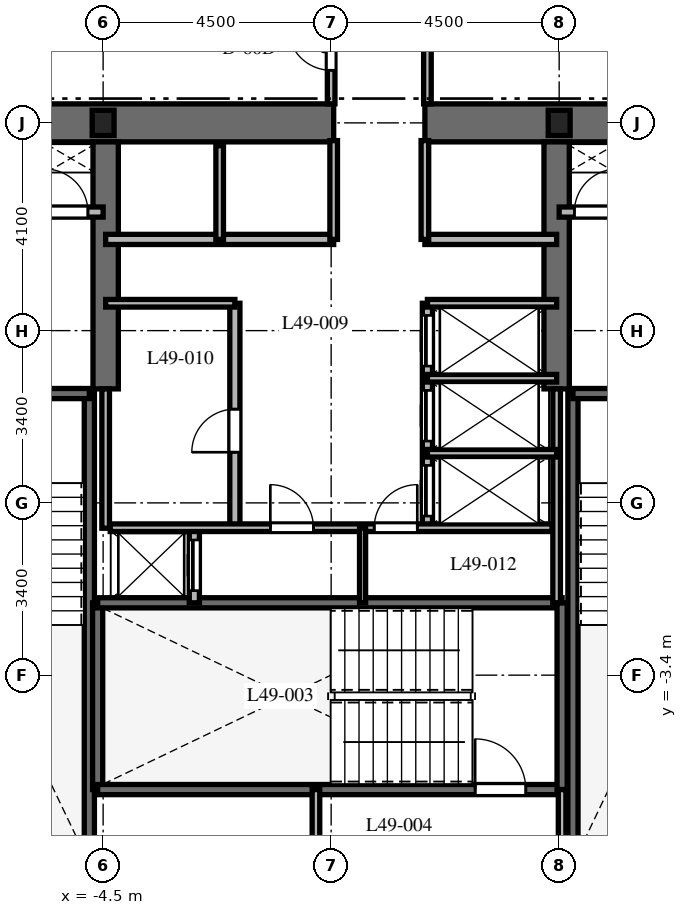
"""IFC4 building model, lengths in metres.
Left out: names, types, materials, properties, quantities, classifications, styles, units other than length and angle.
Written with IfcOpenShell. Run it as: python <this file> out.ifc"""

import sys

from ifc_helpers import new_model, si_unit, direction, frame, frame_2d, origin, origin_2d, place, context, subcontext, project, spatial, rectangle, i_section, extrude, element, fill, save


model = new_model("IFC4")
c1 = context("Model", 3, precision=1e-05, world=origin(), true_north=direction((0.0, 1.0)))
c2 = subcontext(c1, "Body", "Model", "MODEL_VIEW")
j1 = project(units=[si_unit("LENGTHUNIT", "METRE"), si_unit("PLANEANGLEUNIT", "RADIAN")], contexts=[c1])
p1 = place(None, origin())
s1 = spatial("IfcSite", under=j1, at=p1, CompositionType="ELEMENT")
p2 = place(p1, origin())
s2 = spatial("IfcBuilding", under=s1, at=p2, CompositionType="ELEMENT")
p3 = place(p2, frame((0.0, 0.0, 197.8)))
s3 = spatial("IfcBuildingStorey", under=s2, at=p3, CompositionType="ELEMENT", Elevation=197.8)
p4 = place(p3, frame((-9.375, 7.5, 0.0), z_axis=(0.0, 0.0, 1.0), x_axis=(1.0, 0.0, 0.0)))
e1 = element("IfcWall", 1, at=p4, inside=s3, PredefinedType="SHEAR", context=c2, shape_type="SweptSolid", body=[
    extrude(rectangle(XDim=9.425, YDim=0.75, at=frame_2d((4.712, 0.0))), origin(), (0.0, 0.0, 1.0), 3.7),
])
p5 = place(p3, frame((1.85, 7.5, 0.0), z_axis=(0.0, 0.0, 1.0), x_axis=(1.0, 0.0, 0.0)))
e2 = element("IfcWall", 2, at=p5, inside=s3, PredefinedType="SHEAR", context=c2, shape_type="SweptSolid", body=[
    extrude(rectangle(XDim=7.525, YDim=0.75, at=frame_2d((3.762, 0.0))), origin(), (0.0, 0.0, 1.0), 3.7),
])
for number, where, z_axis, x_axis in (
    (3, (-4.45, 2.25, 0.0), (0.0, 0.0, 1.0), (0.0, 1.0, 0.0)),
    (4, (4.45, 2.25, 0.0), (0.0, 0.0, 1.0), (0.0, 1.0, 0.0)),
):
    element("IfcWall", number, at=place(p3, frame(where, z_axis=z_axis, x_axis=x_axis)), inside=s3, PredefinedType="SHEAR", context=c2, shape_type="SweptSolid", body=[
        extrude(rectangle(XDim=4.875, YDim=0.5, at=frame_2d((2.438, 0.0))), origin(), (0.0, 0.0, 1.0), 3.7),
    ])
p6 = place(p3, frame((-4.772, -6.985, 0.0), z_axis=(0.0, 0.0, 1.0), x_axis=(0.0, 1.0, 0.0)))
e5 = element("IfcWall", 5, at=p6, inside=s3, PredefinedType="SHEAR", context=c2, shape_type="SweptSolid", body=[
    extrude(rectangle(XDim=9.143, YDim=0.2, at=frame_2d((4.572, 0.0))), origin(), (0.0, 0.0, 1.0), 3.7),
])
p7 = place(p3, frame((-8.458, 2.158, 0.0), z_axis=(0.0, 0.0, 1.0), x_axis=(1.0, 0.0, 0.0)))
e6 = element("IfcWall", 6, at=p7, inside=s3, PredefinedType="SHEAR", context=c2, shape_type="SweptSolid", body=[
    extrude(rectangle(XDim=3.686, YDim=0.2, at=frame_2d((1.843, 0.0))), origin(), (0.0, 0.0, 1.0), 3.7),
])
p8 = place(p7, frame((1.3, 0.0, 0.0)))
e7 = element("IfcOpeningElement", 7, at=p8, cuts=e6, PredefinedType="OPENING", context=c2, shape_type="SweptSolid", body=[
    extrude(rectangle(XDim=1.0, YDim=2.15, at=frame_2d((0.5, 1.075))), frame((0.0, 0.11, 0.0), z_axis=(0.0, -1.0, 0.0), x_axis=(1.0, 0.0, 0.0)), (0.0, 0.0, 1.0), 0.22),
])
p9 = place(p3, frame((4.772, -6.985, 0.0), z_axis=(0.0, 0.0, 1.0), x_axis=(0.0, 1.0, 0.0)))
e8 = element("IfcWall", 8, at=p9, inside=s3, PredefinedType="SHEAR", context=c2, shape_type="SweptSolid", body=[
    extrude(rectangle(XDim=9.143, YDim=0.2, at=frame_2d((4.572, 0.0))), origin(), (0.0, 0.0, 1.0), 3.7),
])
p10 = place(p3, frame((4.772, 2.158, 0.0), z_axis=(0.0, 0.0, 1.0), x_axis=(1.0, 0.0, 0.0)))
e9 = element("IfcWall", 9, at=p10, inside=s3, PredefinedType="SHEAR", context=c2, shape_type="SweptSolid", body=[
    extrude(rectangle(XDim=3.686, YDim=0.2, at=frame_2d((1.843, 0.0))), origin(), (0.0, 0.0, 1.0), 3.7),
])
p11 = place(p10, frame((1.35, 0.0, 0.0)))
e10 = element("IfcOpeningElement", 10, at=p11, cuts=e9, PredefinedType="OPENING", context=c2, shape_type="SweptSolid", body=[
    extrude(rectangle(XDim=1.0, YDim=2.15, at=frame_2d((0.5, 1.075))), frame((0.0, 0.11, 0.0), z_axis=(0.0, -1.0, 0.0), x_axis=(1.0, 0.0, 0.0)), (0.0, 0.0, 1.0), 0.22),
])
p12 = place(p3, frame((-4.608, -5.658, 0.0), z_axis=(0.0, 0.0, 1.0), x_axis=(0.0, 1.0, 0.0)))
e11 = element("IfcWall", 11, at=p12, inside=s3, PredefinedType="SHEAR", context=c2, shape_type="SweptSolid", body=[
    extrude(rectangle(XDim=3.686, YDim=0.2, at=frame_2d((1.843, 0.0))), origin(), (0.0, 0.0, 1.0), 3.7),
])
p13 = place(p3, frame((-4.608, -5.658, 0.0), z_axis=(0.0, 0.0, 1.0), x_axis=(1.0, 0.0, 0.0)))
e12 = element("IfcWall", 12, at=p13, inside=s3, PredefinedType="SHEAR", context=c2, shape_type="SweptSolid", body=[
    extrude(rectangle(XDim=9.166, YDim=0.2, at=frame_2d((4.583, 0.0))), origin(), (0.0, 0.0, 1.0), 3.7),
])
p14 = place(p13, frame((7.45, 0.0, 0.0)))
e13 = element("IfcOpeningElement", 13, at=p14, cuts=e12, PredefinedType="OPENING", context=c2, shape_type="SweptSolid", body=[
    extrude(rectangle(XDim=1.0, YDim=2.15, at=frame_2d((0.5, 1.075))), frame((0.0, 0.11, 0.0), z_axis=(0.0, -1.0, 0.0), x_axis=(1.0, 0.0, 0.0)), (0.0, 0.0, 1.0), 0.22),
])
p15 = place(p3, frame((-4.608, -1.972, 0.0), z_axis=(0.0, 0.0, 1.0), x_axis=(1.0, 0.0, 0.0)))
e14 = element("IfcWall", 14, at=p15, inside=s3, PredefinedType="SHEAR", context=c2, shape_type="SweptSolid", body=[
    extrude(rectangle(XDim=9.166, YDim=0.2, at=frame_2d((4.583, 0.0))), origin(), (0.0, 0.0, 1.0), 3.7),
])
p16 = place(p3, frame((4.558, -5.658, 0.0), z_axis=(0.0, 0.0, 1.0), x_axis=(0.0, 1.0, 0.0)))
e15 = element("IfcWall", 15, at=p16, inside=s3, PredefinedType="SHEAR", context=c2, shape_type="SweptSolid", body=[
    extrude(rectangle(XDim=3.686, YDim=0.2, at=frame_2d((1.843, 0.0))), origin(), (0.0, 0.0, 1.0), 3.7),
])
for number, where, z_axis, x_axis in (
    (16, (4.5, 7.5, 0.0), (0.0, 0.0, 1.0), (1.0, 0.0, 0.0)),
    (17, (-4.5, 7.5, 0.0), (0.0, 0.0, 1.0), (1.0, 0.0, 0.0)),
):
    element("IfcColumn", number, at=place(p3, frame(where, z_axis=z_axis, x_axis=x_axis)), inside=s3, PredefinedType="COLUMN", context=c2, shape_type="SweptSolid", body=[
        extrude(i_section(OverallWidth=0.432, OverallDepth=0.498, WebThickness=0.056, FlangeThickness=0.089, at=origin_2d()), origin(), (0.0, 0.0, 1.0), 3.7),
    ])
for number, where, z_axis, x_axis in (
    (18, (-0.3, -7.02, 0.0), (0.0, 0.0, 1.0), (0.0, 1.0, 0.0)),
    (19, (4.558, -7.02, 0.0), (0.0, 0.0, 1.0), (0.0, 1.0, 0.0)),
):
    element("IfcWall", number, at=place(p3, frame(where, z_axis=z_axis, x_axis=x_axis)), inside=s3, PredefinedType="PARTITIONING", context=c2, shape_type="SweptSolid", body=[
        extrude(rectangle(XDim=1.362, YDim=0.15, at=frame_2d((0.681, 0.0))), origin(), (0.0, 0.0, 1.0), 3.35),
    ])
p17 = place(p3, frame((-8.55, 5.74, 0.0), z_axis=(0.0, 0.0, 1.0), x_axis=(1.0, 0.0, 0.0)))
e20 = element("IfcWall", 20, at=p17, inside=s3, PredefinedType="PARTITIONING", context=c2, shape_type="SweptSolid", body=[
    extrude(rectangle(XDim=4.05, YDim=0.2, at=frame_2d((2.025, 0.0))), origin(), (0.0, 0.0, 1.0), 3.35),
])
p18 = place(p17, frame((0.75, 0.0, 0.0)))
e21 = element("IfcOpeningElement", 21, at=p18, cuts=e20, PredefinedType="OPENING", context=c2, shape_type="SweptSolid", body=[
    extrude(rectangle(XDim=1.1, YDim=2.2, at=frame_2d((0.55, 1.1))), frame((0.0, 0.11, 0.0), z_axis=(0.0, -1.0, 0.0), x_axis=(1.0, 0.0, 0.0)), (0.0, 0.0, 1.0), 0.22),
])
p19 = place(p17, frame((2.9, 0.0, 0.0)))
e22 = element("IfcOpeningElement", 22, at=p19, cuts=e20, PredefinedType="OPENING", context=c2, shape_type="SweptSolid", body=[
    extrude(rectangle(XDim=0.85, YDim=2.03, at=frame_2d((0.425, 1.015))), frame((0.0, 0.11, 0.0), z_axis=(0.0, -1.0, 0.0), x_axis=(1.0, 0.0, 0.0)), (0.0, 0.0, 1.0), 0.22),
])
p20 = place(p3, frame((4.5, 5.74, 0.0), z_axis=(0.0, 0.0, 1.0), x_axis=(1.0, 0.0, 0.0)))
e23 = element("IfcWall", 23, at=p20, inside=s3, PredefinedType="PARTITIONING", context=c2, shape_type="SweptSolid", body=[
    extrude(rectangle(XDim=4.05, YDim=0.2, at=frame_2d((2.025, 0.0))), origin(), (0.0, 0.0, 1.0), 3.35),
])
p21 = place(p20, frame((0.3, 0.0, 0.0)))
e24 = element("IfcOpeningElement", 24, at=p21, cuts=e23, PredefinedType="OPENING", context=c2, shape_type="SweptSolid", body=[
    extrude(rectangle(XDim=0.85, YDim=2.03, at=frame_2d((0.425, 1.015))), frame((0.0, 0.11, 0.0), z_axis=(0.0, -1.0, 0.0), x_axis=(1.0, 0.0, 0.0)), (0.0, 0.0, 1.0), 0.22),
])
p22 = place(p20, frame((2.15, 0.0, 0.0)))
e25 = element("IfcOpeningElement", 25, at=p22, cuts=e23, PredefinedType="OPENING", context=c2, shape_type="SweptSolid", body=[
    extrude(rectangle(XDim=1.1, YDim=2.2, at=frame_2d((0.55, 1.1))), frame((0.0, 0.11, 0.0), z_axis=(0.0, -1.0, 0.0), x_axis=(1.0, 0.0, 0.0)), (0.0, 0.0, 1.0), 0.22),
])
p23 = place(p3, frame((-2.7, -1.972, 0.0), z_axis=(0.0, 0.0, 1.0), x_axis=(0.0, 1.0, 0.0)))
e26 = element("IfcWall", 26, at=p23, inside=s3, PredefinedType="PARTITIONING", context=c2, shape_type="SweptSolid", body=[
    extrude(rectangle(XDim=1.472, YDim=0.2, at=frame_2d((0.736, 0.0))), origin(), (0.0, 0.0, 1.0), 3.35),
])
p24 = place(p23, frame((0.24, 0.0, 0.0)))
e27 = element("IfcOpeningElement", 27, at=p24, cuts=e26, PredefinedType="OPENING", context=c2, shape_type="SweptSolid", body=[
    extrude(rectangle(XDim=1.0, YDim=2.2, at=frame_2d((0.5, 1.1))), frame((0.0, 0.11, 0.0), z_axis=(0.0, -1.0, 0.0), x_axis=(1.0, 0.0, 0.0)), (0.0, 0.0, 1.0), 0.22),
])
p25 = place(p3, frame((-4.45, 5.2, 0.0), z_axis=(0.0, 0.0, 1.0), x_axis=(1.0, 0.0, 0.0)))
e28 = element("IfcWall", 28, at=p25, inside=s3, PredefinedType="PARTITIONING", context=c2, shape_type="SweptSolid", body=[
    extrude(rectangle(XDim=4.5, YDim=0.2, at=frame_2d((2.25, 0.0))), origin(), (0.0, 0.0, 1.0), 3.35),
])
p26 = place(p3, frame((1.85, 5.2, 0.0), z_axis=(0.0, 0.0, 1.0), x_axis=(1.0, 0.0, 0.0)))
e29 = element("IfcWall", 29, at=p26, inside=s3, PredefinedType="PARTITIONING", context=c2, shape_type="SweptSolid", body=[
    extrude(rectangle(XDim=2.6, YDim=0.2, at=frame_2d((1.3, 0.0))), origin(), (0.0, 0.0, 1.0), 3.35),
])
p27 = place(p3, frame((-2.2, 5.2, 0.0), z_axis=(0.0, 0.0, 1.0), x_axis=(0.0, 1.0, 0.0)))
e30 = element("IfcWall", 30, at=p27, inside=s3, PredefinedType="PARTITIONING", context=c2, shape_type="SweptSolid", body=[
    extrude(rectangle(XDim=1.85, YDim=0.15, at=frame_2d((0.925, 0.0))), origin(), (0.0, 0.0, 1.0), 3.35),
])
for number, where, z_axis, x_axis in (
    (31, (0.05, 5.2, 0.0), (0.0, 0.0, 1.0), (0.0, 1.0, 0.0)),
    (32, (1.85, 5.2, 0.0), (0.0, 0.0, 1.0), (0.0, 1.0, 0.0)),
):
    element("IfcWall", number, at=place(p3, frame(where, z_axis=z_axis, x_axis=x_axis)), inside=s3, PredefinedType="PARTITIONING", context=c2, shape_type="SweptSolid", body=[
        extrude(rectangle(XDim=1.95, YDim=0.15, at=frame_2d((0.975, 0.0))), origin(), (0.0, 0.0, 1.0), 3.35),
    ])
p28 = place(p3, frame((-4.45, -0.5, 0.0), z_axis=(0.0, 0.0, 1.0), x_axis=(0.0, 1.0, 0.0)))
e33 = element("IfcWall", 33, at=p28, inside=s3, PredefinedType="PARTITIONING", context=c2, shape_type="SweptSolid", body=[
    extrude(rectangle(XDim=2.75, YDim=0.15, at=frame_2d((1.375, 0.0))), origin(), (0.0, 0.0, 1.0), 3.35),
])
p29 = place(p3, frame((4.45, -1.972, 0.0), z_axis=(0.0, 0.0, 1.0), x_axis=(0.0, 1.0, 0.0)))
e34 = element("IfcWall", 34, at=p29, inside=s3, PredefinedType="PARTITIONING", context=c2, shape_type="SweptSolid", body=[
    extrude(rectangle(XDim=4.222, YDim=0.15, at=frame_2d((2.111, 0.0))), origin(), (0.0, 0.0, 1.0), 3.35),
])
p30 = place(p3, frame((-1.9, -0.5, 0.0), z_axis=(0.0, 0.0, 1.0), x_axis=(0.0, 1.0, 0.0)))
e35 = element("IfcWall", 35, at=p30, inside=s3, PredefinedType="PARTITIONING", context=c2, shape_type="SweptSolid", body=[
    extrude(rectangle(XDim=4.44, YDim=0.2, at=frame_2d((2.22, 0.0))), origin(), (0.0, 0.0, 1.0), 3.35),
])
p31 = place(p30, frame((1.5, 0.0, 0.0)))
e36 = element("IfcOpeningElement", 36, at=p31, cuts=e35, PredefinedType="OPENING", context=c2, shape_type="SweptSolid", body=[
    extrude(rectangle(XDim=0.85, YDim=2.03, at=frame_2d((0.425, 1.015))), frame((0.0, 0.11, 0.0), z_axis=(0.0, -1.0, 0.0), x_axis=(1.0, 0.0, 0.0)), (0.0, 0.0, 1.0), 0.22),
])
p32 = place(p3, frame((-4.45, 3.94, 0.0), z_axis=(0.0, 0.0, 1.0), x_axis=(1.0, 0.0, 0.0)))
e37 = element("IfcWall", 37, at=p32, inside=s3, PredefinedType="PARTITIONING", context=c2, shape_type="SweptSolid", body=[
    extrude(rectangle(XDim=2.55, YDim=0.15, at=frame_2d((1.275, 0.0))), origin(), (0.0, 0.0, 1.0), 3.35),
])
p33 = place(p3, frame((1.9, -0.5, 0.0), z_axis=(0.0, 0.0, 1.0), x_axis=(0.0, 1.0, 0.0)))
e38 = element("IfcWall", 38, at=p33, inside=s3, PredefinedType="PARTITIONING", context=c2, shape_type="SweptSolid", body=[
    extrude(rectangle(XDim=4.44, YDim=0.2, at=frame_2d((2.22, 0.0))), origin(), (0.0, 0.0, 1.0), 3.35),
])
p34 = place(p33, frame((0.24, 0.0, 0.0)))
e39 = element("IfcOpeningElement", 39, at=p34, cuts=e38, PredefinedType="OPENING", context=c2, shape_type="SweptSolid", body=[
    extrude(rectangle(XDim=1.0, YDim=2.2, at=frame_2d((0.5, 1.1))), frame((0.0, 0.11, 0.0), z_axis=(0.0, -1.0, 0.0), x_axis=(1.0, 0.0, 0.0)), (0.0, 0.0, 1.0), 0.22),
])
p35 = place(p33, frame((1.72, 0.0, 0.0)))
e40 = element("IfcOpeningElement", 40, at=p35, cuts=e38, PredefinedType="OPENING", context=c2, shape_type="SweptSolid", body=[
    extrude(rectangle(XDim=1.0, YDim=2.2, at=frame_2d((0.5, 1.1))), frame((0.0, 0.11, 0.0), z_axis=(0.0, -1.0, 0.0), x_axis=(1.0, 0.0, 0.0)), (0.0, 0.0, 1.0), 0.22),
])
p36 = place(p33, frame((3.2, 0.0, 0.0)))
e41 = element("IfcOpeningElement", 41, at=p36, cuts=e38, PredefinedType="OPENING", context=c2, shape_type="SweptSolid", body=[
    extrude(rectangle(XDim=1.0, YDim=2.2, at=frame_2d((0.5, 1.1))), frame((0.0, 0.11, 0.0), z_axis=(0.0, -1.0, 0.0), x_axis=(1.0, 0.0, 0.0)), (0.0, 0.0, 1.0), 0.22),
])
for number, where, z_axis, x_axis in (
    (42, (1.9, 3.94, 0.0), (0.0, 0.0, 1.0), (1.0, 0.0, 0.0)),
    (43, (1.9, 0.98, 0.0), (0.0, 0.0, 1.0), (1.0, 0.0, 0.0)),
    (44, (1.9, 2.46, 0.0), (0.0, 0.0, 1.0), (1.0, 0.0, 0.0)),
):
    element("IfcWall", number, at=place(p3, frame(where, z_axis=z_axis, x_axis=x_axis)), inside=s3, PredefinedType="PARTITIONING", context=c2, shape_type="SweptSolid", body=[
        extrude(rectangle(XDim=2.55, YDim=0.15, at=frame_2d((1.275, 0.0))), origin(), (0.0, 0.0, 1.0), 3.35),
    ])
p37 = place(p3, frame((-4.36, -0.49, 0.0), z_axis=(0.0, 0.0, 1.0), x_axis=(1.0, 0.0, 0.0)))
e45 = element("IfcWall", 45, at=p37, inside=s3, PredefinedType="PARTITIONING", context=c2, shape_type="SweptSolid", body=[
    extrude(rectangle(XDim=8.72, YDim=0.15, at=frame_2d((4.36, 0.0))), origin(), (0.0, 0.0, 1.0), 3.35),
])
p38 = place(p37, frame((3.16, 0.0, 0.0)))
e46 = element("IfcOpeningElement", 46, at=p38, cuts=e45, PredefinedType="OPENING", context=c2, shape_type="SweptSolid", body=[
    extrude(rectangle(XDim=0.85, YDim=2.03, at=frame_2d((0.425, 1.015))), frame((0.0, 0.085, 0.0), z_axis=(0.0, -1.0, 0.0), x_axis=(1.0, 0.0, 0.0)), (0.0, 0.0, 1.0), 0.17),
])
p39 = place(p37, frame((5.21, 0.0, 0.0)))
e47 = element("IfcOpeningElement", 47, at=p39, cuts=e45, PredefinedType="OPENING", context=c2, shape_type="SweptSolid", body=[
    extrude(rectangle(XDim=0.85, YDim=2.03, at=frame_2d((0.425, 1.015))), frame((0.0, 0.085, 0.0), z_axis=(0.0, -1.0, 0.0), x_axis=(1.0, 0.0, 0.0)), (0.0, 0.0, 1.0), 0.17),
])
p40 = place(p3, frame((0.62, -1.972, 0.0), z_axis=(0.0, 0.0, 1.0), x_axis=(0.0, 1.0, 0.0)))
e48 = element("IfcWall", 48, at=p40, inside=s3, PredefinedType="PARTITIONING", context=c2, shape_type="SweptSolid", body=[
    extrude(rectangle(XDim=1.472, YDim=0.12, at=frame_2d((0.736, 0.0))), origin(), (0.0, 0.0, 1.0), 3.35),
])
p41 = place(p3, frame((1.9, 10.05, 0.0), z_axis=(0.0, 0.0, 1.0), x_axis=(0.0, -1.0, 0.0)))
e49 = element("IfcWall", 49, at=p41, inside=s3, PredefinedType="PARTITIONING", context=c2, shape_type="SweptSolid", body=[
    extrude(rectangle(XDim=2.175, YDim=0.15, at=frame_2d((1.087, 0.0))), origin(), (0.0, 0.0, 1.0), 3.35),
])
p42 = place(p3, frame((0.0, 7.875, 0.0), z_axis=(0.0, 0.0, 1.0), x_axis=(0.0, 1.0, 0.0)))
e50 = element("IfcWall", 50, at=p42, inside=s3, PredefinedType="PARTITIONING", context=c2, shape_type="SweptSolid", body=[
    extrude(rectangle(XDim=2.175, YDim=0.15, at=frame_2d((1.087, 0.0))), origin(), (0.0, 0.0, 1.0), 3.35),
])
p43 = place(p42, frame((0.663, 0.0, 0.0)))
e51 = element("IfcOpeningElement", 51, at=p43, cuts=e50, PredefinedType="OPENING", context=c2, shape_type="SweptSolid", body=[
    extrude(rectangle(XDim=0.85, YDim=2.03, at=frame_2d((0.425, 1.015))), frame((0.0, 0.085, 0.0), z_axis=(0.0, -1.0, 0.0), x_axis=(1.0, 0.0, 0.0)), (0.0, 0.0, 1.0), 0.17),
])
p44 = place(p14, origin())
e52 = element("IfcDoor", 52, at=p44, inside=s3, OperationType="SINGLE_SWING_LEFT", PredefinedType="DOOR", context=c2, shape_type="SweptSolid", body=[
    extrude(rectangle(XDim=1.0, YDim=2.15, at=frame_2d((0.5, 1.075))), frame((0.0, 0.025, 0.0), z_axis=(0.0, -1.0, 0.0), x_axis=(1.0, 0.0, 0.0)), (0.0, 0.0, 1.0), 0.05),
])
fill(e13, e52)
p45 = place(p19, origin())
e53 = element("IfcDoor", 53, at=p45, inside=s3, OperationType="SINGLE_SWING_LEFT", PredefinedType="DOOR", context=c2, shape_type="SweptSolid", body=[
    extrude(rectangle(XDim=0.85, YDim=2.03, at=frame_2d((0.425, 1.015))), frame((0.0, 0.025, 0.0), z_axis=(0.0, -1.0, 0.0), x_axis=(1.0, 0.0, 0.0)), (0.0, 0.0, 1.0), 0.05),
])
fill(e22, e53)
p46 = place(p21, origin())
e54 = element("IfcDoor", 54, at=p46, inside=s3, OperationType="SINGLE_SWING_RIGHT", PredefinedType="DOOR", context=c2, shape_type="SweptSolid", body=[
    extrude(rectangle(XDim=0.85, YDim=2.03, at=frame_2d((0.425, 1.015))), frame((0.0, 0.025, 0.0), z_axis=(0.0, -1.0, 0.0), x_axis=(1.0, 0.0, 0.0)), (0.0, 0.0, 1.0), 0.05),
])
fill(e24, e54)
p47 = place(p24, origin())
e55 = element("IfcDoor", 55, at=p47, inside=s3, OperationType="SLIDING_TO_LEFT", PredefinedType="DOOR", context=c2, shape_type="SweptSolid", body=[
    extrude(rectangle(XDim=1.0, YDim=2.2, at=frame_2d((0.5, 1.1))), frame((0.0, 0.025, 0.0), z_axis=(0.0, -1.0, 0.0), x_axis=(1.0, 0.0, 0.0)), (0.0, 0.0, 1.0), 0.05),
])
fill(e27, e55)
p48 = place(p31, origin())
e56 = element("IfcDoor", 56, at=p48, inside=s3, OperationType="SINGLE_SWING_LEFT", PredefinedType="DOOR", context=c2, shape_type="SweptSolid", body=[
    extrude(rectangle(XDim=0.85, YDim=2.03, at=frame_2d((0.425, 1.015))), frame((0.0, 0.025, 0.0), z_axis=(0.0, -1.0, 0.0), x_axis=(1.0, 0.0, 0.0)), (0.0, 0.0, 1.0), 0.05),
])
fill(e36, e56)
p49 = place(p34, origin())
e57 = element("IfcDoor", 57, at=p49, inside=s3, OperationType="SLIDING_TO_RIGHT", PredefinedType="DOOR", context=c2, shape_type="SweptSolid", body=[
    extrude(rectangle(XDim=1.0, YDim=2.2, at=frame_2d((0.5, 1.1))), frame((0.0, 0.025, 0.0), z_axis=(0.0, -1.0, 0.0), x_axis=(1.0, 0.0, 0.0)), (0.0, 0.0, 1.0), 0.05),
])
fill(e39, e57)
p50 = place(p35, origin())
e58 = element("IfcDoor", 58, at=p50, inside=s3, OperationType="SLIDING_TO_RIGHT", PredefinedType="DOOR", context=c2, shape_type="SweptSolid", body=[
    extrude(rectangle(XDim=1.0, YDim=2.2, at=frame_2d((0.5, 1.1))), frame((0.0, 0.025, 0.0), z_axis=(0.0, -1.0, 0.0), x_axis=(1.0, 0.0, 0.0)), (0.0, 0.0, 1.0), 0.05),
])
fill(e40, e58)
p51 = place(p36, origin())
e59 = element("IfcDoor", 59, at=p51, inside=s3, OperationType="SLIDING_TO_RIGHT", PredefinedType="DOOR", context=c2, shape_type="SweptSolid", body=[
    extrude(rectangle(XDim=1.0, YDim=2.2, at=frame_2d((0.5, 1.1))), frame((0.0, 0.025, 0.0), z_axis=(0.0, -1.0, 0.0), x_axis=(1.0, 0.0, 0.0)), (0.0, 0.0, 1.0), 0.05),
])
fill(e41, e59)
p52 = place(p38, origin())
e60 = element("IfcDoor", 60, at=p52, inside=s3, OperationType="SINGLE_SWING_LEFT", PredefinedType="DOOR", context=c2, shape_type="SweptSolid", body=[
    extrude(rectangle(XDim=0.85, YDim=2.03, at=frame_2d((0.425, 1.015))), frame((0.0, 0.025, 0.0), z_axis=(0.0, -1.0, 0.0), x_axis=(1.0, 0.0, 0.0)), (0.0, 0.0, 1.0), 0.05),
])
fill(e46, e60)
p53 = place(p39, origin())
e61 = element("IfcDoor", 61, at=p53, inside=s3, OperationType="SINGLE_SWING_RIGHT", PredefinedType="DOOR", context=c2, shape_type="SweptSolid", body=[
    extrude(rectangle(XDim=0.85, YDim=2.03, at=frame_2d((0.425, 1.015))), frame((0.0, 0.025, 0.0), z_axis=(0.0, -1.0, 0.0), x_axis=(1.0, 0.0, 0.0)), (0.0, 0.0, 1.0), 0.05),
])
fill(e47, e61)
p54 = place(p43, origin())
e62 = element("IfcDoor", 62, at=p54, inside=s3, OperationType="SINGLE_SWING_RIGHT", PredefinedType="DOOR", context=c2, shape_type="SweptSolid", body=[
    extrude(rectangle(XDim=0.85, YDim=2.03, at=frame_2d((0.425, 1.015))), frame((0.0, 0.025, 0.0), z_axis=(0.0, -1.0, 0.0), x_axis=(1.0, 0.0, 0.0)), (0.0, 0.0, 1.0), 0.05),
])
fill(e51, e62)
save(model, sys.argv[1])
